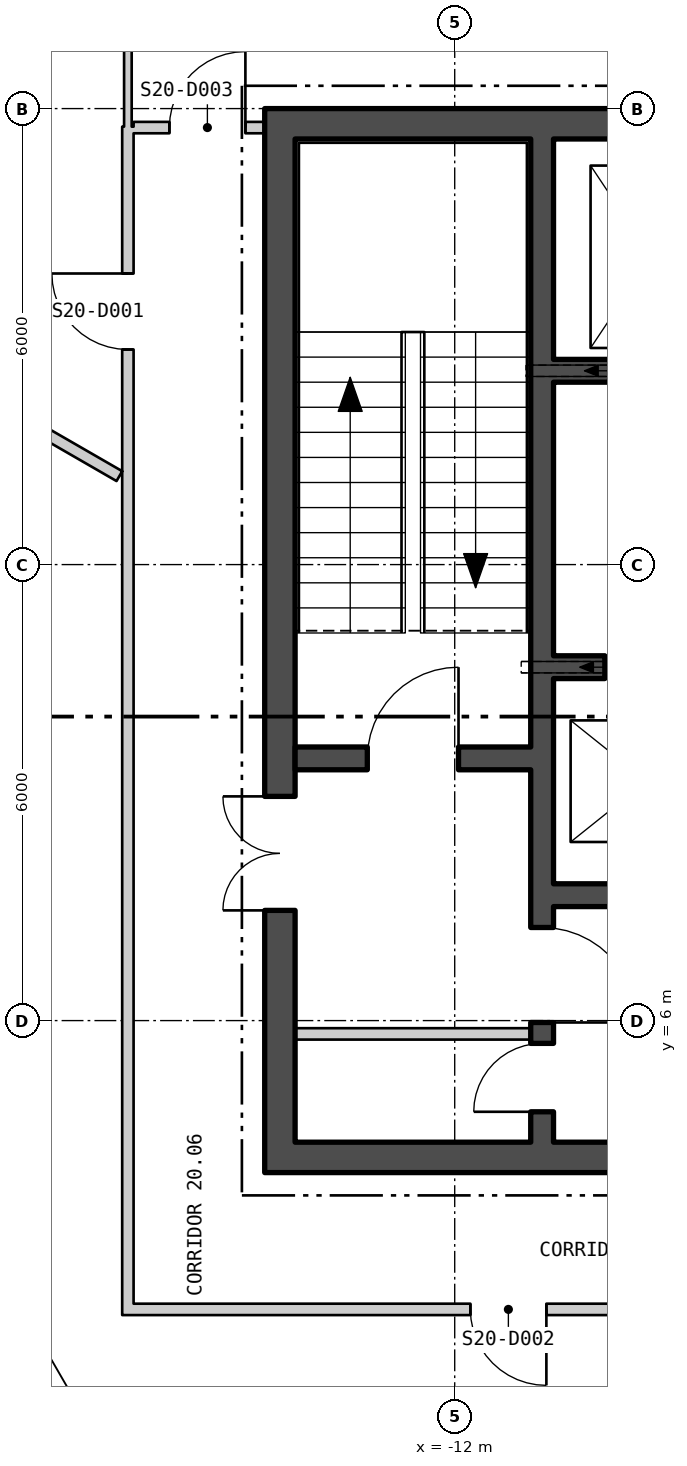
"""IFC4 building model, lengths in metres.
Left out: names, types, materials, properties, quantities, classifications, styles, units other than length and angle.
Written with IfcOpenShell. Run it as: python <this file> out.ifc"""

import sys

from ifc_helpers import new_model, si_unit, direction, frame, frame_2d, origin, place, context, subcontext, project, spatial, polyline, rectangle, outline, extrude, element, fill, save


model = new_model("IFC4")
c1 = context("Model", 3, precision=1e-05, world=origin(), true_north=direction((0.0, 1.0)))
c2 = subcontext(c1, "Body", "Model", "MODEL_VIEW")
j1 = project(units=[si_unit("LENGTHUNIT", "METRE"), si_unit("PLANEANGLEUNIT", "RADIAN")], contexts=[c1])
p1 = place(None, origin())
s1 = spatial("IfcSite", under=j1, at=p1, CompositionType="ELEMENT")
p2 = place(p1, origin())
s2 = spatial("IfcBuilding", under=s1, at=p2, CompositionType="ELEMENT")
p3 = place(p2, frame((0.0, 0.0, 268.8)))
s3 = spatial("IfcBuildingStorey", under=s2, at=p3, CompositionType="ELEMENT", Elevation=268.8)
p4 = place(p3, frame((-25.54, 15.35, -0.18), z_axis=(0.0, 0.0, 1.0), x_axis=(0.499999764979, -0.866025539474, 0.0)))
e1 = element("IfcWall", 1, at=p4, inside=s3, PredefinedType="SOLIDWALL", context=c2, shape_type="SweptSolid", body=[
    extrude(outline(polyline([(-0.13, -0.225), (45.87, -0.225), (45.61, 0.225), (0.13, 0.225), (-0.13, -0.225)])), origin(), (0.0, 0.0, 1.0), 3.68),
])
p5 = place(p4, frame((1.424, 0.0, 1.08)))
e2 = element("IfcOpeningElement", 2, at=p5, cuts=e1, PredefinedType="OPENING", context=c2, shape_type="SweptSolid", body=[
    extrude(rectangle(XDim=2.4, YDim=2.0, at=frame_2d((1.2, 1.0))), frame((0.0, 0.235, 0.0), z_axis=(0.0, -1.0, 0.0), x_axis=(1.0, 0.0, 0.0)), (0.0, 0.0, 1.0), 0.47),
])
p6 = place(p4, frame((5.893, 0.0, 1.08)))
e3 = element("IfcOpeningElement", 3, at=p6, cuts=e1, PredefinedType="OPENING", context=c2, shape_type="SweptSolid", body=[
    extrude(rectangle(XDim=2.4, YDim=2.0, at=frame_2d((1.2, 1.0))), frame((0.0, 0.235, 0.0), z_axis=(0.0, -1.0, 0.0), x_axis=(1.0, 0.0, 0.0)), (0.0, 0.0, 1.0), 0.47),
])
p7 = place(p4, frame((10.401, 0.0, 1.08)))
e4 = element("IfcOpeningElement", 4, at=p7, cuts=e1, PredefinedType="OPENING", context=c2, shape_type="SweptSolid", body=[
    extrude(rectangle(XDim=2.4, YDim=2.0, at=frame_2d((1.2, 1.0))), frame((0.0, 0.235, 0.0), z_axis=(0.0, -1.0, 0.0), x_axis=(1.0, 0.0, 0.0)), (0.0, 0.0, 1.0), 0.47),
])
p8 = place(p4, frame((14.909, 0.0, 1.08)))
e5 = element("IfcOpeningElement", 5, at=p8, cuts=e1, PredefinedType="OPENING", context=c2, shape_type="SweptSolid", body=[
    extrude(rectangle(XDim=2.4, YDim=2.0, at=frame_2d((1.2, 1.0))), frame((0.0, 0.235, 0.0), z_axis=(0.0, -1.0, 0.0), x_axis=(1.0, 0.0, 0.0)), (0.0, 0.0, 1.0), 0.47),
])
p9 = place(p4, frame((19.416, 0.0, 1.08)))
e6 = element("IfcOpeningElement", 6, at=p9, cuts=e1, PredefinedType="OPENING", context=c2, shape_type="SweptSolid", body=[
    extrude(rectangle(XDim=2.4, YDim=2.0, at=frame_2d((1.2, 1.0))), frame((0.0, 0.235, 0.0), z_axis=(0.0, -1.0, 0.0), x_axis=(1.0, 0.0, 0.0)), (0.0, 0.0, 1.0), 0.47),
])
p10 = place(p4, frame((23.924, 0.0, 1.08)))
e7 = element("IfcOpeningElement", 7, at=p10, cuts=e1, PredefinedType="OPENING", context=c2, shape_type="SweptSolid", body=[
    extrude(rectangle(XDim=2.4, YDim=2.0, at=frame_2d((1.2, 1.0))), frame((0.0, 0.235, 0.0), z_axis=(0.0, -1.0, 0.0), x_axis=(1.0, 0.0, 0.0)), (0.0, 0.0, 1.0), 0.47),
])
p11 = place(p4, frame((28.431, 0.0, 1.08)))
e8 = element("IfcOpeningElement", 8, at=p11, cuts=e1, PredefinedType="OPENING", context=c2, shape_type="SweptSolid", body=[
    extrude(rectangle(XDim=2.4, YDim=2.0, at=frame_2d((1.2, 1.0))), frame((0.0, 0.235, 0.0), z_axis=(0.0, -1.0, 0.0), x_axis=(1.0, 0.0, 0.0)), (0.0, 0.0, 1.0), 0.47),
])
p12 = place(p4, frame((32.939, 0.0, 1.08)))
e9 = element("IfcOpeningElement", 9, at=p12, cuts=e1, PredefinedType="OPENING", context=c2, shape_type="SweptSolid", body=[
    extrude(rectangle(XDim=2.4, YDim=2.0, at=frame_2d((1.2, 1.0))), frame((0.0, 0.235, 0.0), z_axis=(0.0, -1.0, 0.0), x_axis=(1.0, 0.0, 0.0)), (0.0, 0.0, 1.0), 0.47),
])
p13 = place(p4, frame((37.447, 0.0, 1.08)))
e10 = element("IfcOpeningElement", 10, at=p13, cuts=e1, PredefinedType="OPENING", context=c2, shape_type="SweptSolid", body=[
    extrude(rectangle(XDim=2.4, YDim=2.0, at=frame_2d((1.2, 1.0))), frame((0.0, 0.235, 0.0), z_axis=(0.0, -1.0, 0.0), x_axis=(1.0, 0.0, 0.0)), (0.0, 0.0, 1.0), 0.47),
])
p14 = place(p4, frame((41.916, 0.0, 1.08)))
e11 = element("IfcOpeningElement", 11, at=p14, cuts=e1, PredefinedType="OPENING", context=c2, shape_type="SweptSolid", body=[
    extrude(rectangle(XDim=2.4, YDim=2.0, at=frame_2d((1.2, 1.0))), frame((0.0, 0.235, 0.0), z_axis=(0.0, -1.0, 0.0), x_axis=(1.0, 0.0, 0.0)), (0.0, 0.0, 1.0), 0.47),
])
p15 = place(p3, frame((-14.5, 4.2, 0.0), z_axis=(0.0, 0.0, 1.0), x_axis=(1.0, 0.0, 0.0)))
e12 = element("IfcWall", 12, at=p15, inside=s3, PredefinedType="SHEAR", context=c2, shape_type="SweptSolid", body=[
    extrude(rectangle(XDim=29.0, YDim=0.4, at=frame_2d((14.5, 0.0))), origin(), (0.0, 0.0, 1.0), 3.7),
])
p16 = place(p15, frame((9.0, 0.0, 0.0)))
e13 = element("IfcOpeningElement", 13, at=p16, cuts=e12, PredefinedType="OPENING", context=c2, shape_type="SweptSolid", body=[
    extrude(rectangle(XDim=1.8, YDim=2.4, at=frame_2d((0.9, 1.2))), frame((0.0, 0.21, 0.0), z_axis=(0.0, -1.0, 0.0), x_axis=(1.0, 0.0, 0.0)), (0.0, 0.0, 1.0), 0.42),
])
p17 = place(p15, frame((19.0, 0.0, 0.0)))
e14 = element("IfcOpeningElement", 14, at=p17, cuts=e12, PredefinedType="OPENING", context=c2, shape_type="SweptSolid", body=[
    extrude(rectangle(XDim=1.8, YDim=2.4, at=frame_2d((0.9, 1.2))), frame((0.0, 0.21, 0.0), z_axis=(0.0, -1.0, 0.0), x_axis=(1.0, 0.0, 0.0)), (0.0, 0.0, 1.0), 0.42),
])
p18 = place(p3, frame((-14.5, 17.8, 0.0), z_axis=(0.0, 0.0, 1.0), x_axis=(1.0, 0.0, 0.0)))
e15 = element("IfcWall", 15, at=p18, inside=s3, PredefinedType="SHEAR", context=c2, shape_type="SweptSolid", body=[
    extrude(rectangle(XDim=29.0, YDim=0.4, at=frame_2d((14.5, 0.0))), origin(), (0.0, 0.0, 1.0), 3.7),
])
p19 = place(p3, frame((-14.3, 4.4, 0.0), z_axis=(0.0, 0.0, 1.0), x_axis=(0.0, 1.0, 0.0)))
e16 = element("IfcWall", 16, at=p19, inside=s3, PredefinedType="SHEAR", context=c2, shape_type="SweptSolid", body=[
    extrude(rectangle(XDim=13.2, YDim=0.4, at=frame_2d((6.6, 0.0))), origin(), (0.0, 0.0, 1.0), 3.7),
])
p20 = place(p19, frame((3.05, 0.0, 0.0)))
e17 = element("IfcOpeningElement", 17, at=p20, cuts=e16, PredefinedType="OPENING", context=c2, shape_type="SweptSolid", body=[
    extrude(rectangle(XDim=1.5, YDim=2.1, at=frame_2d((0.75, 1.05))), frame((0.0, 0.21, 0.0), z_axis=(0.0, -1.0, 0.0), x_axis=(1.0, 0.0, 0.0)), (0.0, 0.0, 1.0), 0.42),
])
p21 = place(p3, frame((-10.85, 4.4, 0.0), z_axis=(0.0, 0.0, 1.0), x_axis=(0.0, 1.0, 0.0)))
e18 = element("IfcWall", 18, at=p21, inside=s3, PredefinedType="SHEAR", context=c2, shape_type="SweptSolid", body=[
    extrude(rectangle(XDim=13.2, YDim=0.3, at=frame_2d((6.6, 0.0))), origin(), (0.0, 0.0, 1.0), 3.7),
])
p22 = place(p21, frame((1.575, 0.0, 0.0)))
e19 = element("IfcOpeningElement", 19, at=p22, cuts=e18, PredefinedType="OPENING", context=c2, shape_type="SweptSolid", body=[
    extrude(rectangle(XDim=1.25, YDim=2.1, at=frame_2d((0.625, 1.05))), frame((0.0, 0.16, 0.0), z_axis=(0.0, -1.0, 0.0), x_axis=(1.0, 0.0, 0.0)), (0.0, 0.0, 1.0), 0.32),
])
p23 = place(p21, frame((0.4, 0.0, 0.0)))
e20 = element("IfcOpeningElement", 20, at=p23, cuts=e18, PredefinedType="OPENING", context=c2, shape_type="SweptSolid", body=[
    extrude(rectangle(XDim=0.9, YDim=2.1, at=frame_2d((0.45, 1.05))), frame((0.0, 0.16, 0.0), z_axis=(0.0, -1.0, 0.0), x_axis=(1.0, 0.0, 0.0)), (0.0, 0.0, 1.0), 0.32),
])
p24 = place(p3, frame((-14.1, 9.45, 0.0), z_axis=(0.0, 0.0, 1.0), x_axis=(1.0, 0.0, 0.0)))
e21 = element("IfcWall", 21, at=p24, inside=s3, PredefinedType="SHEAR", context=c2, shape_type="SweptSolid", body=[
    extrude(rectangle(XDim=3.1, YDim=0.3, at=frame_2d((1.55, 0.0))), origin(), (0.0, 0.0, 1.0), 3.7),
])
p25 = place(p24, frame((0.95, 0.0, 0.0)))
e22 = element("IfcOpeningElement", 22, at=p25, cuts=e21, PredefinedType="OPENING", context=c2, shape_type="SweptSolid", body=[
    extrude(rectangle(XDim=1.2, YDim=2.1, at=frame_2d((0.6, 1.05))), frame((0.0, 0.16, 0.0), z_axis=(0.0, -1.0, 0.0), x_axis=(1.0, 0.0, 0.0)), (0.0, 0.0, 1.0), 0.32),
])
p26 = place(p3, frame((-10.7, 14.55, 0.0), z_axis=(0.0, 0.0, 1.0), x_axis=(1.0, 0.0, 0.0)))
e23 = element("IfcWall", 23, at=p26, inside=s3, PredefinedType="SHEAR", context=c2, shape_type="SweptSolid", body=[
    extrude(rectangle(XDim=21.4, YDim=0.3, at=frame_2d((10.7, 0.0))), origin(), (0.0, 0.0, 1.0), 3.7),
])
p27 = place(p26, frame((0.738, 0.0, 0.0)))
e24 = element("IfcOpeningElement", 24, at=p27, cuts=e23, PredefinedType="OPENING", context=c2, shape_type="SweptSolid", body=[
    extrude(rectangle(XDim=1.1, YDim=2.1, at=frame_2d((0.55, 1.05))), frame((0.0, 0.16, 0.0), z_axis=(0.0, -1.0, 0.0), x_axis=(1.0, 0.0, 0.0)), (0.0, 0.0, 1.0), 0.32),
])
p28 = place(p26, frame((3.462, 0.0, 0.0)))
e25 = element("IfcOpeningElement", 25, at=p28, cuts=e23, PredefinedType="OPENING", context=c2, shape_type="SweptSolid", body=[
    extrude(rectangle(XDim=1.1, YDim=2.1, at=frame_2d((0.55, 1.05))), frame((0.0, 0.16, 0.0), z_axis=(0.0, -1.0, 0.0), x_axis=(1.0, 0.0, 0.0)), (0.0, 0.0, 1.0), 0.32),
])
p29 = place(p26, frame((6.138, 0.0, 0.0)))
e26 = element("IfcOpeningElement", 26, at=p29, cuts=e23, PredefinedType="OPENING", context=c2, shape_type="SweptSolid", body=[
    extrude(rectangle(XDim=1.1, YDim=2.1, at=frame_2d((0.55, 1.05))), frame((0.0, 0.16, 0.0), z_axis=(0.0, -1.0, 0.0), x_axis=(1.0, 0.0, 0.0)), (0.0, 0.0, 1.0), 0.32),
])
p30 = place(p26, frame((8.812, 0.0, 0.0)))
e27 = element("IfcOpeningElement", 27, at=p30, cuts=e23, PredefinedType="OPENING", context=c2, shape_type="SweptSolid", body=[
    extrude(rectangle(XDim=1.1, YDim=2.1, at=frame_2d((0.55, 1.05))), frame((0.0, 0.16, 0.0), z_axis=(0.0, -1.0, 0.0), x_axis=(1.0, 0.0, 0.0)), (0.0, 0.0, 1.0), 0.32),
])
p31 = place(p26, frame((19.562, 0.0, 0.0)))
e28 = element("IfcOpeningElement", 28, at=p31, cuts=e23, PredefinedType="OPENING", context=c2, shape_type="SweptSolid", body=[
    extrude(rectangle(XDim=1.1, YDim=2.1, at=frame_2d((0.55, 1.05))), frame((0.0, 0.16, 0.0), z_axis=(0.0, -1.0, 0.0), x_axis=(1.0, 0.0, 0.0)), (0.0, 0.0, 1.0), 0.32),
])
p32 = place(p26, frame((14.213, 0.0, 0.0)))
e29 = element("IfcOpeningElement", 29, at=p32, cuts=e23, PredefinedType="OPENING", context=c2, shape_type="SweptSolid", body=[
    extrude(rectangle(XDim=1.0, YDim=2.1, at=frame_2d((0.5, 1.05))), frame((0.0, 0.16, 0.0), z_axis=(0.0, -1.0, 0.0), x_axis=(1.0, 0.0, 0.0)), (0.0, 0.0, 1.0), 0.32),
])
p33 = place(p3, frame((-10.7, 10.65, 0.0), z_axis=(0.0, 0.0, 1.0), x_axis=(1.0, 0.0, 0.0)))
e30 = element("IfcWall", 30, at=p33, inside=s3, PredefinedType="SHEAR", context=c2, shape_type="SweptSolid", body=[
    extrude(rectangle(XDim=10.3, YDim=0.3, at=frame_2d((5.15, 0.0))), origin(), (0.0, 0.0, 1.0), 3.7),
])
p34 = place(p33, frame((0.675, 0.0, 0.0)))
e31 = element("IfcOpeningElement", 31, at=p34, cuts=e30, PredefinedType="OPENING", context=c2, shape_type="SweptSolid", body=[
    extrude(rectangle(XDim=1.1, YDim=2.1, at=frame_2d((0.55, 1.05))), frame((0.0, 0.16, 0.0), z_axis=(0.0, -1.0, 0.0), x_axis=(1.0, 0.0, 0.0)), (0.0, 0.0, 1.0), 0.32),
])
p35 = place(p33, frame((3.275, 0.0, 0.0)))
e32 = element("IfcOpeningElement", 32, at=p35, cuts=e30, PredefinedType="OPENING", context=c2, shape_type="SweptSolid", body=[
    extrude(rectangle(XDim=1.1, YDim=2.1, at=frame_2d((0.55, 1.05))), frame((0.0, 0.16, 0.0), z_axis=(0.0, -1.0, 0.0), x_axis=(1.0, 0.0, 0.0)), (0.0, 0.0, 1.0), 0.32),
])
p36 = place(p33, frame((5.825, 0.0, 0.0)))
e33 = element("IfcOpeningElement", 33, at=p36, cuts=e30, PredefinedType="OPENING", context=c2, shape_type="SweptSolid", body=[
    extrude(rectangle(XDim=1.1, YDim=2.1, at=frame_2d((0.55, 1.05))), frame((0.0, 0.16, 0.0), z_axis=(0.0, -1.0, 0.0), x_axis=(1.0, 0.0, 0.0)), (0.0, 0.0, 1.0), 0.32),
])
p37 = place(p33, frame((8.425, 0.0, 0.0)))
e34 = element("IfcOpeningElement", 34, at=p37, cuts=e30, PredefinedType="OPENING", context=c2, shape_type="SweptSolid", body=[
    extrude(rectangle(XDim=1.0, YDim=2.1, at=frame_2d((0.5, 1.05))), frame((0.0, 0.16, 0.0), z_axis=(0.0, -1.0, 0.0), x_axis=(1.0, 0.0, 0.0)), (0.0, 0.0, 1.0), 0.32),
])
p38 = place(p3, frame((-10.7, 7.65, 0.0), z_axis=(0.0, 0.0, 1.0), x_axis=(1.0, 0.0, 0.0)))
e35 = element("IfcWall", 35, at=p38, inside=s3, PredefinedType="SHEAR", context=c2, shape_type="SweptSolid", body=[
    extrude(rectangle(XDim=10.3, YDim=0.3, at=frame_2d((5.15, 0.0))), origin(), (0.0, 0.0, 1.0), 3.7),
])
p39 = place(p3, frame((-14.1, 5.825, 0.0), z_axis=(0.0, 0.0, 1.0), x_axis=(1.0, 0.0, 0.0)))
e36 = element("IfcWall", 36, at=p39, inside=s3, PredefinedType="PARTITIONING", context=c2, shape_type="SweptSolid", body=[
    extrude(rectangle(XDim=3.1, YDim=0.15, at=frame_2d((1.55, 0.0))), origin(), (0.0, 0.0, 1.0), 3.7),
])
p40 = place(p3, frame((-17.943, 14.047, 0.0), z_axis=(0.0, 0.0, 1.0), x_axis=(0.866251516137, -0.49960815725, 0.0)))
e37 = element("IfcWall", 37, at=p40, inside=s3, PredefinedType="PARTITIONING", context=c2, shape_type="SweptSolid", body=[
    extrude(rectangle(XDim=1.767, YDim=0.15, at=frame_2d((0.884, 0.0))), origin(), (0.0, 0.0, 1.0), 3.7),
])
p41 = place(p3, frame((-16.3, 2.125, 0.0), z_axis=(0.0, 0.0, 1.0), x_axis=(0.0, 1.0, 0.0)))
e38 = element("IfcWall", 38, at=p41, inside=s3, PredefinedType="PARTITIONING", context=c2, shape_type="SweptSolid", body=[
    extrude(rectangle(XDim=15.637, YDim=0.15, at=frame_2d((7.819, 0.0))), origin(), (0.0, 0.0, 1.0), 3.7),
])
p42 = place(p41, frame((12.705, 0.0, 0.0)))
e39 = element("IfcOpeningElement", 39, at=p42, cuts=e38, PredefinedType="OPENING", context=c2, shape_type="SweptSolid", body=[
    extrude(rectangle(XDim=1.0, YDim=2.1, at=frame_2d((0.5, 1.05))), frame((0.0, 0.085, 0.0), z_axis=(0.0, -1.0, 0.0), x_axis=(1.0, 0.0, 0.0)), (0.0, 0.0, 1.0), 0.17),
])
p43 = place(p3, frame((-16.3, 17.762, 0.0), z_axis=(0.0, 0.0, 1.0), x_axis=(0.0, 1.0, 0.0)))
e40 = element("IfcWall", 40, at=p43, inside=s3, PredefinedType="PARTITIONING", context=c2, shape_type="SweptSolid", body=[
    extrude(rectangle(XDim=1.988, YDim=0.1, at=frame_2d((0.994, 0.0))), origin(), (0.0, 0.0, 1.0), 3.7),
])
p44 = place(p3, frame((-16.225, 2.2, 0.0), z_axis=(0.0, 0.0, 1.0), x_axis=(1.0, 0.0, 0.0)))
e41 = element("IfcWall", 41, at=p44, inside=s3, PredefinedType="PARTITIONING", context=c2, shape_type="SweptSolid", body=[
    extrude(rectangle(XDim=8.35, YDim=0.15, at=frame_2d((4.175, 0.0))), origin(), (0.0, 0.0, 1.0), 3.7),
])
p45 = place(p44, frame((4.431, 0.0, 0.0)))
e42 = element("IfcOpeningElement", 42, at=p45, cuts=e41, PredefinedType="OPENING", context=c2, shape_type="SweptSolid", body=[
    extrude(rectangle(XDim=1.0, YDim=2.1, at=frame_2d((0.5, 1.05))), frame((0.0, 0.085, 0.0), z_axis=(0.0, -1.0, 0.0), x_axis=(1.0, 0.0, 0.0)), (0.0, 0.0, 1.0), 0.17),
])
p46 = place(p3, frame((-16.225, 17.75, 0.0), z_axis=(0.0, 0.0, 1.0), x_axis=(1.0, 0.0, 0.0)))
e43 = element("IfcWall", 43, at=p46, inside=s3, PredefinedType="PARTITIONING", context=c2, shape_type="SweptSolid", body=[
    extrude(rectangle(XDim=1.725, YDim=0.15, at=frame_2d((0.863, 0.0))), origin(), (0.0, 0.0, 1.0), 3.7),
])
p47 = place(p46, frame((0.471, 0.0, 0.0)))
e44 = element("IfcOpeningElement", 44, at=p47, cuts=e43, PredefinedType="OPENING", context=c2, shape_type="SweptSolid", body=[
    extrude(rectangle(XDim=1.0, YDim=2.1, at=frame_2d((0.5, 1.05))), frame((0.0, 0.085, 0.0), z_axis=(0.0, -1.0, 0.0), x_axis=(1.0, 0.0, 0.0)), (0.0, 0.0, 1.0), 0.17),
])
p48 = place(p8, origin())
e45 = element("IfcWindow", 45, at=p48, inside=s3, PartitioningType="SINGLE_PANEL", PredefinedType="WINDOW", context=c2, shape_type="SweptSolid", body=[
    extrude(rectangle(XDim=2.4, YDim=2.0, at=frame_2d((1.2, 1.0))), frame((0.0, 0.105, 0.0), z_axis=(0.0, -1.0, 0.0), x_axis=(1.0, 0.0, 0.0)), (0.0, 0.0, 1.0), 0.06),
])
fill(e5, e45)
p49 = place(p34, origin())
e46 = element("IfcDoor", 46, at=p49, inside=s3, OperationType="SLIDING_TO_LEFT", PredefinedType="DOOR", context=c2, shape_type="SweptSolid", body=[
    extrude(rectangle(XDim=1.1, YDim=2.1, at=frame_2d((0.55, 1.05))), frame((0.0, 0.025, 0.0), z_axis=(0.0, -1.0, 0.0), x_axis=(1.0, 0.0, 0.0)), (0.0, 0.0, 1.0), 0.05),
])
fill(e31, e46)
p50 = place(p25, origin())
e47 = element("IfcDoor", 47, at=p50, inside=s3, OperationType="SINGLE_SWING_LEFT", PredefinedType="DOOR", context=c2, shape_type="SweptSolid", body=[
    extrude(rectangle(XDim=1.2, YDim=2.1, at=frame_2d((0.6, 1.05))), frame((0.0, 0.025, 0.0), z_axis=(0.0, -1.0, 0.0), x_axis=(1.0, 0.0, 0.0)), (0.0, 0.0, 1.0), 0.05),
])
fill(e22, e47)
p51 = place(p22, origin())
e48 = element("IfcDoor", 48, at=p51, inside=s3, OperationType="SINGLE_SWING_LEFT", PredefinedType="DOOR", context=c2, shape_type="SweptSolid", body=[
    extrude(rectangle(XDim=1.25, YDim=2.1, at=frame_2d((0.625, 1.05))), frame((0.0, 0.025, 0.0), z_axis=(0.0, -1.0, 0.0), x_axis=(1.0, 0.0, 0.0)), (0.0, 0.0, 1.0), 0.05),
])
fill(e19, e48)
p52 = place(p20, origin())
e49 = element("IfcDoor", 49, at=p52, inside=s3, OperationType="DOUBLE_DOOR_SINGLE_SWING", PredefinedType="DOOR", context=c2, shape_type="SweptSolid", body=[
    extrude(rectangle(XDim=1.5, YDim=2.1, at=frame_2d((0.75, 1.05))), frame((0.0, 0.025, 0.0), z_axis=(0.0, -1.0, 0.0), x_axis=(1.0, 0.0, 0.0)), (0.0, 0.0, 1.0), 0.05),
])
fill(e17, e49)
p53 = place(p23, origin())
e50 = element("IfcDoor", 50, at=p53, inside=s3, OperationType="SINGLE_SWING_RIGHT", PredefinedType="DOOR", context=c2, shape_type="SweptSolid", body=[
    extrude(rectangle(XDim=0.9, YDim=2.1, at=frame_2d((0.45, 1.05))), frame((0.0, 0.025, 0.0), z_axis=(0.0, -1.0, 0.0), x_axis=(1.0, 0.0, 0.0)), (0.0, 0.0, 1.0), 0.05),
])
fill(e20, e50)
p54 = place(p42, origin())
e51 = element("IfcDoor", 51, at=p54, inside=s3, OperationType="SINGLE_SWING_LEFT", PredefinedType="DOOR", context=c2, shape_type="SweptSolid", body=[
    extrude(rectangle(XDim=1.0, YDim=2.1, at=frame_2d((0.5, 1.05))), frame((0.0, 0.025, 0.0), z_axis=(0.0, -1.0, 0.0), x_axis=(1.0, 0.0, 0.0)), (0.0, 0.0, 1.0), 0.05),
])
fill(e39, e51)
p55 = place(p45, origin())
e52 = element("IfcDoor", 52, at=p55, inside=s3, OperationType="SINGLE_SWING_RIGHT", PredefinedType="DOOR", context=c2, shape_type="SweptSolid", body=[
    extrude(rectangle(XDim=1.0, YDim=2.1, at=frame_2d((0.5, 1.05))), frame((0.0, 0.025, 0.0), z_axis=(0.0, -1.0, 0.0), x_axis=(1.0, 0.0, 0.0)), (0.0, 0.0, 1.0), 0.05),
])
fill(e42, e52)
p56 = place(p47, origin())
e53 = element("IfcDoor", 53, at=p56, inside=s3, OperationType="SINGLE_SWING_LEFT", PredefinedType="DOOR", context=c2, shape_type="SweptSolid", body=[
    extrude(rectangle(XDim=1.0, YDim=2.1, at=frame_2d((0.5, 1.05))), frame((0.0, 0.025, 0.0), z_axis=(0.0, -1.0, 0.0), x_axis=(1.0, 0.0, 0.0)), (0.0, 0.0, 1.0), 0.05),
])
fill(e44, e53)
save(model, sys.argv[1])
